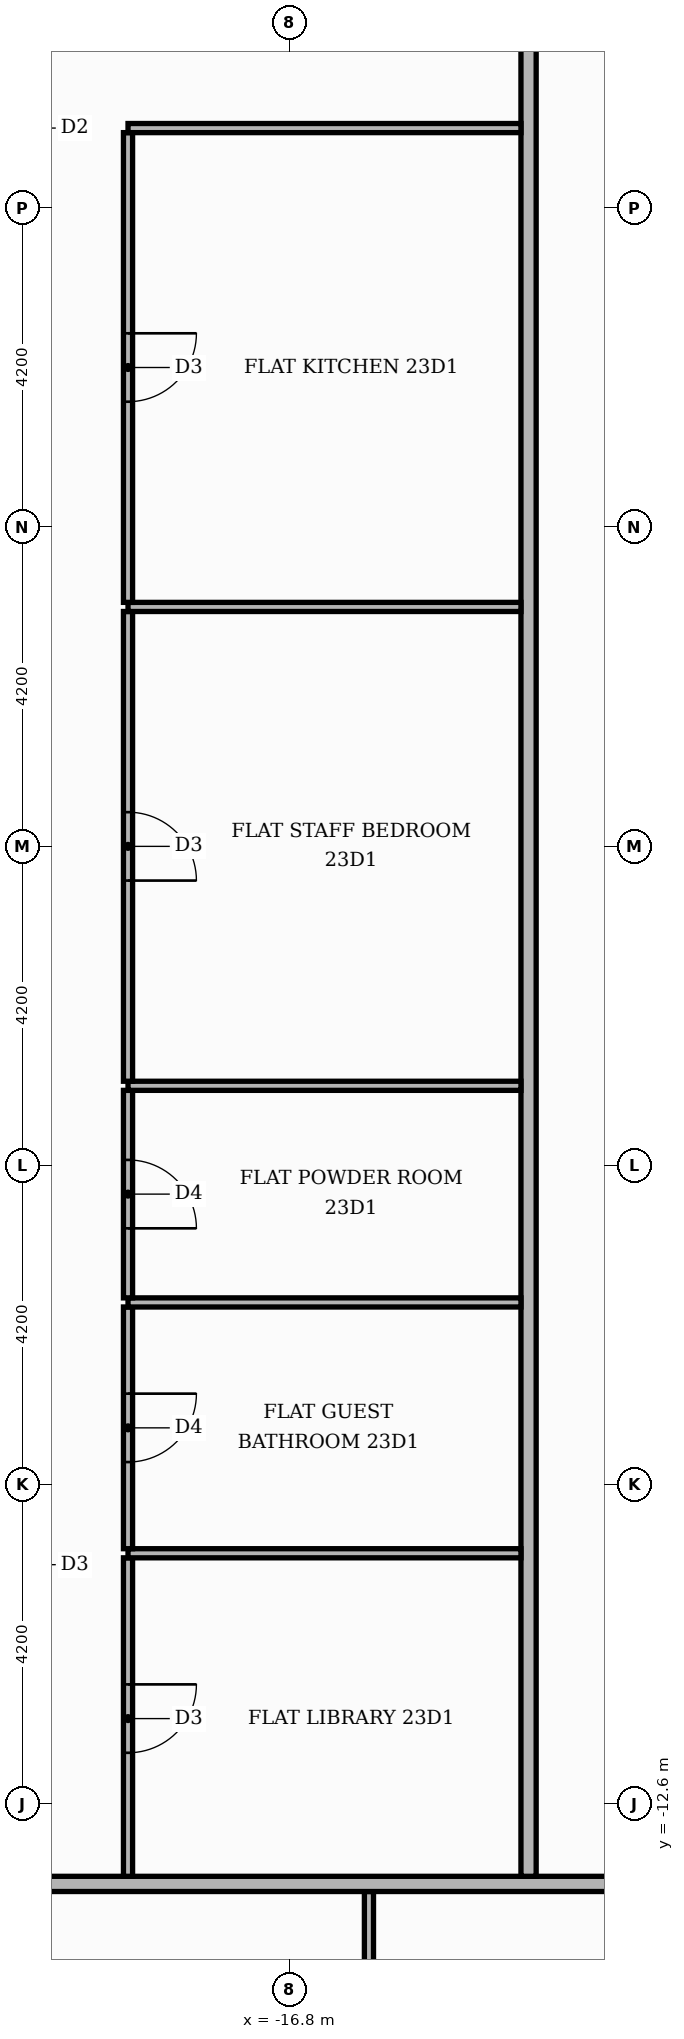
"""IFC4 building model, lengths in metres.
Left out: names, types, materials, properties, quantities, classifications, styles, units other than length and angle.
Written with IfcOpenShell. Run it as: python <this file> out.ifc"""

import sys

from ifc_helpers import new_model, si_unit, direction, frame, frame_2d, origin, place, context, subcontext, project, spatial, rectangle, extrude, element, fill, save


model = new_model("IFC4")
c1 = context("Model", 3, precision=1e-05, world=origin(), true_north=direction((0.0, 1.0)))
c2 = subcontext(c1, "Body", "Model", "MODEL_VIEW")
j1 = project(units=[si_unit("LENGTHUNIT", "METRE"), si_unit("PLANEANGLEUNIT", "RADIAN")], contexts=[c1])
p1 = place(None, origin())
s1 = spatial("IfcSite", under=j1, at=p1, CompositionType="ELEMENT")
p2 = place(p1, origin())
s2 = spatial("IfcBuilding", under=s1, at=p2, CompositionType="ELEMENT")
p3 = place(p2, frame((0.0, 0.0, 98.7)))
s3 = spatial("IfcBuildingStorey", under=s2, at=p3, CompositionType="ELEMENT", Elevation=98.7)
p4 = place(p3, frame((-15.75, -20.06, 0.0), z_axis=(0.0, 0.0, 1.0), x_axis=(0.0, 1.0, 0.0)))
e1 = element("IfcWall", 1, at=p4, inside=s3, PredefinedType="PARTITIONING", context=c2, shape_type="SweptSolid", body=[
    extrude(rectangle(XDim=6.31, YDim=0.12, at=frame_2d((3.155, 0.0))), origin(), (0.0, 0.0, 1.0), 3.48),
])
p5 = place(p4, frame((2.675, 0.0, 0.0)))
e2 = element("IfcOpeningElement", 2, at=p5, cuts=e1, PredefinedType="OPENING", context=c2, shape_type="SweptSolid", body=[
    extrude(rectangle(XDim=1.0, YDim=2.1, at=frame_2d((0.5, 1.05))), frame((0.0, 0.07, 0.0), z_axis=(0.0, -1.0, 0.0), x_axis=(1.0, 0.0, 0.0)), (0.0, 0.0, 1.0), 0.14),
])
p6 = place(p3, frame((-25.42, -13.65, 0.0), z_axis=(0.0, 0.0, 1.0), x_axis=(1.0, 0.0, 0.0)))
e3 = element("IfcWall", 3, at=p6, inside=s3, PredefinedType="PARTITIONING", context=c2, shape_type="SweptSolid", body=[
    extrude(rectangle(XDim=39.07, YDim=0.2, at=frame_2d((19.535, 0.0))), origin(), (0.0, 0.0, 1.0), 3.48),
])
p7 = place(p6, frame((13.32, 0.0, 0.0)))
e4 = element("IfcOpeningElement", 4, at=p7, cuts=e3, PredefinedType="OPENING", context=c2, shape_type="SweptSolid", body=[
    extrude(rectangle(XDim=1.1, YDim=2.4, at=frame_2d((0.55, 1.2))), frame((0.0, 0.11, 0.0), z_axis=(0.0, -1.0, 0.0), x_axis=(1.0, 0.0, 0.0)), (0.0, 0.0, 1.0), 0.22),
])
p8 = place(p6, frame((23.82, 0.0, 0.0)))
e5 = element("IfcOpeningElement", 5, at=p8, cuts=e3, PredefinedType="OPENING", context=c2, shape_type="SweptSolid", body=[
    extrude(rectangle(XDim=1.1, YDim=2.4, at=frame_2d((0.55, 1.2))), frame((0.0, 0.11, 0.0), z_axis=(0.0, -1.0, 0.0), x_axis=(1.0, 0.0, 0.0)), (0.0, 0.0, 1.0), 0.22),
])
p9 = place(p3, frame((-18.92, -13.55, 0.0), z_axis=(0.0, 0.0, 1.0), x_axis=(0.0, 1.0, 0.0)))
e6 = element("IfcWall", 6, at=p9, inside=s3, PredefinedType="PARTITIONING", context=c2, shape_type="SweptSolid", body=[
    extrude(rectangle(XDim=4.19, YDim=0.12, at=frame_2d((2.095, 0.0))), origin(), (0.0, 0.0, 1.0), 3.48),
])
p10 = place(p9, frame((1.625, 0.0, 0.0)))
e7 = element("IfcOpeningElement", 7, at=p10, cuts=e6, PredefinedType="OPENING", context=c2, shape_type="SweptSolid", body=[
    extrude(rectangle(XDim=0.9, YDim=2.1, at=frame_2d((0.45, 1.05))), frame((0.0, 0.07, 0.0), z_axis=(0.0, -1.0, 0.0), x_axis=(1.0, 0.0, 0.0)), (0.0, 0.0, 1.0), 0.14),
])
p11 = place(p3, frame((-13.65, -13.55, 0.0), z_axis=(0.0, 0.0, 1.0), x_axis=(0.0, 1.0, 0.0)))
e8 = element("IfcWall", 8, at=p11, inside=s3, PredefinedType="PARTITIONING", context=c2, shape_type="SweptSolid", body=[
    extrude(rectangle(XDim=27.1, YDim=0.2, at=frame_2d((13.55, 0.0))), origin(), (0.0, 0.0, 1.0), 3.48),
])
p12 = place(p11, frame((24.55, 0.0, 0.0)))
e9 = element("IfcOpeningElement", 9, at=p12, cuts=e8, PredefinedType="OPENING", context=c2, shape_type="SweptSolid", body=[
    extrude(rectangle(XDim=1.1, YDim=2.4, at=frame_2d((0.55, 1.2))), frame((0.0, 0.11, 0.0), z_axis=(0.0, -1.0, 0.0), x_axis=(1.0, 0.0, 0.0)), (0.0, 0.0, 1.0), 0.22),
])
p13 = place(p3, frame((-18.92, -9.3, 0.0), z_axis=(0.0, 0.0, 1.0), x_axis=(1.0, 0.0, 0.0)))
e10 = element("IfcWall", 10, at=p13, inside=s3, PredefinedType="PARTITIONING", context=c2, shape_type="SweptSolid", body=[
    extrude(rectangle(XDim=5.17, YDim=0.12, at=frame_2d((2.585, 0.0))), origin(), (0.0, 0.0, 1.0), 3.48),
])
p14 = place(p3, frame((-18.92, -9.24, 0.0), z_axis=(0.0, 0.0, 1.0), x_axis=(0.0, 1.0, 0.0)))
e11 = element("IfcWall", 11, at=p14, inside=s3, PredefinedType="PARTITIONING", context=c2, shape_type="SweptSolid", body=[
    extrude(rectangle(XDim=3.18, YDim=0.12, at=frame_2d((1.59, 0.0))), origin(), (0.0, 0.0, 1.0), 3.48),
])
p15 = place(p14, frame((1.14, 0.0, 0.0)))
e12 = element("IfcOpeningElement", 12, at=p15, cuts=e11, PredefinedType="OPENING", context=c2, shape_type="SweptSolid", body=[
    extrude(rectangle(XDim=0.9, YDim=2.1, at=frame_2d((0.45, 1.05))), frame((0.0, 0.07, 0.0), z_axis=(0.0, -1.0, 0.0), x_axis=(1.0, 0.0, 0.0)), (0.0, 0.0, 1.0), 0.14),
])
p16 = place(p3, frame((-18.92, -6.0, 0.0), z_axis=(0.0, 0.0, 1.0), x_axis=(1.0, 0.0, 0.0)))
e13 = element("IfcWall", 13, at=p16, inside=s3, PredefinedType="PARTITIONING", context=c2, shape_type="SweptSolid", body=[
    extrude(rectangle(XDim=5.17, YDim=0.12, at=frame_2d((2.585, 0.0))), origin(), (0.0, 0.0, 1.0), 3.48),
])
p17 = place(p3, frame((-18.92, -5.94, 0.0), z_axis=(0.0, 0.0, 1.0), x_axis=(0.0, 1.0, 0.0)))
e14 = element("IfcWall", 14, at=p17, inside=s3, PredefinedType="PARTITIONING", context=c2, shape_type="SweptSolid", body=[
    extrude(rectangle(XDim=2.73, YDim=0.12, at=frame_2d((1.365, 0.0))), origin(), (0.0, 0.0, 1.0), 3.48),
])
p18 = place(p17, frame((0.915, 0.0, 0.0)))
e15 = element("IfcOpeningElement", 15, at=p18, cuts=e14, PredefinedType="OPENING", context=c2, shape_type="SweptSolid", body=[
    extrude(rectangle(XDim=0.9, YDim=2.1, at=frame_2d((0.45, 1.05))), frame((0.0, 0.07, 0.0), z_axis=(0.0, -1.0, 0.0), x_axis=(1.0, 0.0, 0.0)), (0.0, 0.0, 1.0), 0.14),
])
p19 = place(p3, frame((-18.92, -3.15, 0.0), z_axis=(0.0, 0.0, 1.0), x_axis=(1.0, 0.0, 0.0)))
e16 = element("IfcWall", 16, at=p19, inside=s3, PredefinedType="PARTITIONING", context=c2, shape_type="SweptSolid", body=[
    extrude(rectangle(XDim=5.17, YDim=0.12, at=frame_2d((2.585, 0.0))), origin(), (0.0, 0.0, 1.0), 3.48),
])
p20 = place(p3, frame((-18.92, -3.09, 0.0), z_axis=(0.0, 0.0, 1.0), x_axis=(0.0, 1.0, 0.0)))
e17 = element("IfcWall", 17, at=p20, inside=s3, PredefinedType="PARTITIONING", context=c2, shape_type="SweptSolid", body=[
    extrude(rectangle(XDim=6.18, YDim=0.12, at=frame_2d((3.09, 0.0))), origin(), (0.0, 0.0, 1.0), 3.48),
])
p21 = place(p20, frame((2.64, 0.0, 0.0)))
e18 = element("IfcOpeningElement", 18, at=p21, cuts=e17, PredefinedType="OPENING", context=c2, shape_type="SweptSolid", body=[
    extrude(rectangle(XDim=0.9, YDim=2.1, at=frame_2d((0.45, 1.05))), frame((0.0, 0.07, 0.0), z_axis=(0.0, -1.0, 0.0), x_axis=(1.0, 0.0, 0.0)), (0.0, 0.0, 1.0), 0.14),
])
p22 = place(p3, frame((-18.92, 3.15, 0.0), z_axis=(0.0, 0.0, 1.0), x_axis=(1.0, 0.0, 0.0)))
e19 = element("IfcWall", 19, at=p22, inside=s3, PredefinedType="PARTITIONING", context=c2, shape_type="SweptSolid", body=[
    extrude(rectangle(XDim=5.17, YDim=0.12, at=frame_2d((2.585, 0.0))), origin(), (0.0, 0.0, 1.0), 3.48),
])
p23 = place(p3, frame((-18.92, 3.21, 0.0), z_axis=(0.0, 0.0, 1.0), x_axis=(0.0, 1.0, 0.0)))
e20 = element("IfcWall", 20, at=p23, inside=s3, PredefinedType="PARTITIONING", context=c2, shape_type="SweptSolid", body=[
    extrude(rectangle(XDim=6.18, YDim=0.12, at=frame_2d((3.09, 0.0))), origin(), (0.0, 0.0, 1.0), 3.48),
])
p24 = place(p23, frame((2.64, 0.0, 0.0)))
e21 = element("IfcOpeningElement", 21, at=p24, cuts=e20, PredefinedType="OPENING", context=c2, shape_type="SweptSolid", body=[
    extrude(rectangle(XDim=0.9, YDim=2.1, at=frame_2d((0.45, 1.05))), frame((0.0, 0.07, 0.0), z_axis=(0.0, -1.0, 0.0), x_axis=(1.0, 0.0, 0.0)), (0.0, 0.0, 1.0), 0.14),
])
p25 = place(p3, frame((-18.92, 9.45, 0.0), z_axis=(0.0, 0.0, 1.0), x_axis=(1.0, 0.0, 0.0)))
e22 = element("IfcWall", 22, at=p25, inside=s3, PredefinedType="PARTITIONING", context=c2, shape_type="SweptSolid", body=[
    extrude(rectangle(XDim=5.17, YDim=0.12, at=frame_2d((2.585, 0.0))), origin(), (0.0, 0.0, 1.0), 3.48),
])
p26 = place(p24, frame((0.9, 0.0, 0.0), z_axis=(0.0, 0.0, 1.0), x_axis=(-1.0, 0.0, 0.0)))
e23 = element("IfcDoor", 23, at=p26, inside=s3, OperationType="SINGLE_SWING_RIGHT", PredefinedType="DOOR", context=c2, shape_type="SweptSolid", body=[
    extrude(rectangle(XDim=0.9, YDim=2.1, at=frame_2d((0.45, 1.05))), frame((0.0, 0.025, 0.0), z_axis=(0.0, -1.0, 0.0), x_axis=(1.0, 0.0, 0.0)), (0.0, 0.0, 1.0), 0.05),
])
fill(e21, e23)
p27 = place(p21, frame((0.9, 0.0, 0.0), z_axis=(0.0, 0.0, 1.0), x_axis=(-1.0, 0.0, 0.0)))
e24 = element("IfcDoor", 24, at=p27, inside=s3, OperationType="SINGLE_SWING_LEFT", PredefinedType="DOOR", context=c2, shape_type="SweptSolid", body=[
    extrude(rectangle(XDim=0.9, YDim=2.1, at=frame_2d((0.45, 1.05))), frame((0.0, 0.025, 0.0), z_axis=(0.0, -1.0, 0.0), x_axis=(1.0, 0.0, 0.0)), (0.0, 0.0, 1.0), 0.05),
])
fill(e18, e24)
p28 = place(p18, frame((0.9, 0.0, 0.0), z_axis=(0.0, 0.0, 1.0), x_axis=(-1.0, 0.0, 0.0)))
e25 = element("IfcDoor", 25, at=p28, inside=s3, OperationType="SINGLE_SWING_LEFT", PredefinedType="DOOR", context=c2, shape_type="SweptSolid", body=[
    extrude(rectangle(XDim=0.9, YDim=2.1, at=frame_2d((0.45, 1.05))), frame((0.0, 0.025, 0.0), z_axis=(0.0, -1.0, 0.0), x_axis=(1.0, 0.0, 0.0)), (0.0, 0.0, 1.0), 0.05),
])
fill(e15, e25)
p29 = place(p15, frame((0.9, 0.0, 0.0), z_axis=(0.0, 0.0, 1.0), x_axis=(-1.0, 0.0, 0.0)))
e26 = element("IfcDoor", 26, at=p29, inside=s3, OperationType="SINGLE_SWING_RIGHT", PredefinedType="DOOR", context=c2, shape_type="SweptSolid", body=[
    extrude(rectangle(XDim=0.9, YDim=2.1, at=frame_2d((0.45, 1.05))), frame((0.0, 0.025, 0.0), z_axis=(0.0, -1.0, 0.0), x_axis=(1.0, 0.0, 0.0)), (0.0, 0.0, 1.0), 0.05),
])
fill(e12, e26)
p30 = place(p10, frame((0.9, 0.0, 0.0), z_axis=(0.0, 0.0, 1.0), x_axis=(-1.0, 0.0, 0.0)))
e27 = element("IfcDoor", 27, at=p30, inside=s3, OperationType="SINGLE_SWING_RIGHT", PredefinedType="DOOR", context=c2, shape_type="SweptSolid", body=[
    extrude(rectangle(XDim=0.9, YDim=2.1, at=frame_2d((0.45, 1.05))), frame((0.0, 0.025, 0.0), z_axis=(0.0, -1.0, 0.0), x_axis=(1.0, 0.0, 0.0)), (0.0, 0.0, 1.0), 0.05),
])
fill(e7, e27)
save(model, sys.argv[1])
